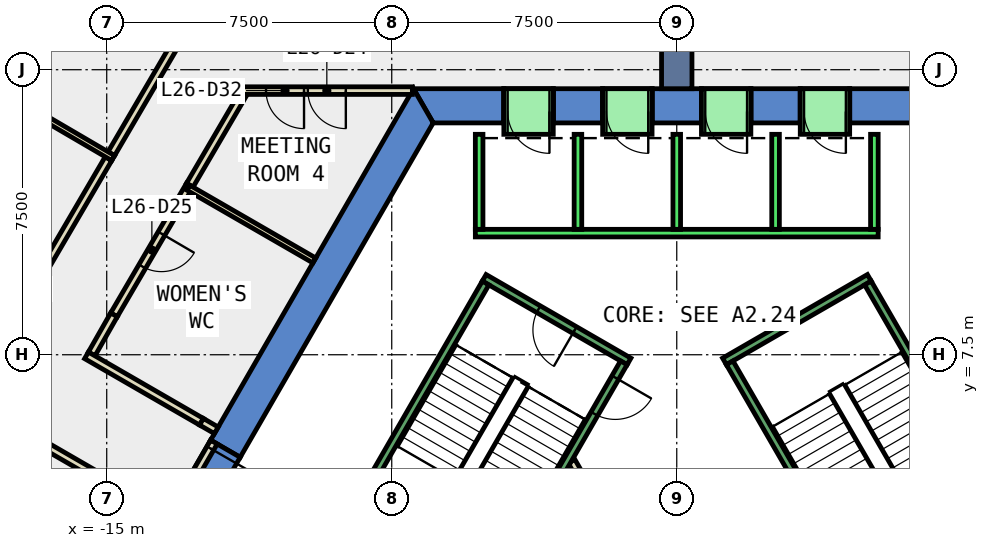
"""IFC4 building model, lengths in metres.
Left out: names, types, materials, properties, quantities, classifications, styles, units other than length and angle.
Written with IfcOpenShell. Run it as: python <this file> out.ifc"""

import sys

from ifc_helpers import new_model, si_unit, direction, frame, frame_2d, origin, place, context, subcontext, project, spatial, polyline, rectangle, outline, extrude, element, fill, save


model = new_model("IFC4")
c1 = context("Model", 3, precision=1e-05, world=origin(), true_north=direction((0.0, 1.0)))
c2 = subcontext(c1, "Body", "Model", "MODEL_VIEW")
j1 = project(units=[si_unit("LENGTHUNIT", "METRE"), si_unit("PLANEANGLEUNIT", "RADIAN")], contexts=[c1])
p1 = place(None, origin())
s1 = spatial("IfcSite", under=j1, at=p1, CompositionType="ELEMENT")
p2 = place(p1, origin())
s2 = spatial("IfcBuilding", under=s1, at=p2, CompositionType="ELEMENT")
p3 = place(p2, frame((0.0, 0.0, 120.2)))
s3 = spatial("IfcBuildingStorey", under=s2, at=p3, CompositionType="ELEMENT", Elevation=120.2)
p4 = place(p3, frame((0.0, 0.0, -0.4)))
e1 = element("IfcWall", 1, at=p4, inside=s3, PredefinedType="SHEAR", context=c2, shape_type="SweptSolid", body=[
    extrude(outline(polyline([(4.55, 14.5), (4.55, 13.6), (6.409, 13.6), (6.928, 14.5), (4.55, 14.5)])), origin(), (0.0, 0.0, 1.0), 4.2),
])
p5 = place(p3, frame((0.0, 0.0, -0.4)))
e2 = element("IfcWall", 2, at=p5, inside=s3, PredefinedType="SHEAR", context=c2, shape_type="SweptSolid", body=[
    extrude(outline(polyline([(1.95, 14.5), (1.95, 13.6), (3.25, 13.6), (3.25, 14.5), (1.95, 14.5)])), origin(), (0.0, 0.0, 1.0), 4.2),
])
p6 = place(p3, frame((0.0, 0.0, -0.4)))
e3 = element("IfcWall", 3, at=p6, inside=s3, PredefinedType="SHEAR", context=c2, shape_type="SweptSolid", body=[
    extrude(outline(polyline([(-0.65, 14.5), (-0.65, 13.6), (0.65, 13.6), (0.65, 14.5), (-0.65, 14.5)])), origin(), (0.0, 0.0, 1.0), 4.2),
])
p7 = place(p3, frame((0.0, 0.0, -0.4)))
e4 = element("IfcWall", 4, at=p7, inside=s3, PredefinedType="SHEAR", context=c2, shape_type="SweptSolid", body=[
    extrude(outline(polyline([(-3.25, 14.5), (-3.25, 13.6), (-1.95, 13.6), (-1.95, 14.5), (-3.25, 14.5)])), origin(), (0.0, 0.0, 1.0), 4.2),
])
p8 = place(p3, frame((0.0, 0.0, -0.4)))
e5 = element("IfcWall", 5, at=p8, inside=s3, PredefinedType="SHEAR", context=c2, shape_type="SweptSolid", body=[
    extrude(outline(polyline([(-4.55, 13.6), (-4.55, 14.5), (-6.928, 14.5), (-6.409, 13.6), (-4.55, 13.6)])), origin(), (0.0, 0.0, 1.0), 4.2),
])
p9 = place(p3, frame((0.0, 0.0, 3.6)))
e6 = element("IfcWall", 6, at=p9, inside=s3, PredefinedType="SHEAR", context=c2, shape_type="SweptSolid", body=[
    extrude(outline(polyline([(3.25, 14.5), (3.25, 13.6), (4.55, 13.6), (4.55, 14.5), (3.25, 14.5)])), origin(), (0.0, 0.0, 1.0), 0.2),
])
p10 = place(p3, frame((0.0, 0.0, 3.6)))
e7 = element("IfcWall", 7, at=p10, inside=s3, PredefinedType="SHEAR", context=c2, shape_type="SweptSolid", body=[
    extrude(outline(polyline([(0.65, 14.5), (0.65, 13.6), (1.95, 13.6), (1.95, 14.5), (0.65, 14.5)])), origin(), (0.0, 0.0, 1.0), 0.2),
])
p11 = place(p3, frame((0.0, 0.0, 3.6)))
e8 = element("IfcWall", 8, at=p11, inside=s3, PredefinedType="SHEAR", context=c2, shape_type="SweptSolid", body=[
    extrude(outline(polyline([(-1.95, 14.5), (-1.95, 13.6), (-0.65, 13.6), (-0.65, 14.5), (-1.95, 14.5)])), origin(), (0.0, 0.0, 1.0), 0.2),
])
p12 = place(p3, frame((0.0, 0.0, 3.6)))
e9 = element("IfcWall", 9, at=p12, inside=s3, PredefinedType="SHEAR", context=c2, shape_type="SweptSolid", body=[
    extrude(outline(polyline([(-4.55, 14.5), (-4.55, 13.6), (-3.25, 13.6), (-3.25, 14.5), (-4.55, 14.5)])), origin(), (0.0, 0.0, 1.0), 0.2),
])
p13 = place(p3, frame((0.0, 0.0, -0.4)))
e10 = element("IfcWall", 10, at=p13, inside=s3, PredefinedType="SHEAR", context=c2, shape_type="SweptSolid", body=[
    extrude(outline(polyline([(-12.267, 5.252), (-11.488, 4.802), (-6.409, 13.6), (-6.928, 14.5), (-12.267, 5.252)])), origin(), (0.0, 0.0, 1.0), 4.2),
])
p14 = place(p3, frame((0.0, 0.0, 3.6)))
e11 = element("IfcWall", 11, at=p14, inside=s3, PredefinedType="SHEAR", context=c2, shape_type="SweptSolid", body=[
    extrude(outline(polyline([(-13.267, 3.52), (-12.488, 3.07), (-11.488, 4.802), (-12.267, 5.252), (-13.267, 3.52)])), origin(), (0.0, 0.0, 1.0), 0.2),
])
p15 = place(p3, frame((0.0, 14.5, -0.4), z_axis=(0.0, 0.0, 1.0), x_axis=(0.0, 1.0, 0.0)))
e12 = element("IfcWall", 12, at=p15, inside=s3, PredefinedType="SHEAR", context=c2, shape_type="SweptSolid", body=[
    extrude(rectangle(XDim=9.0, YDim=0.8, at=frame_2d((4.5, 0.0))), origin(), (0.0, 0.0, 1.0), 4.2),
])
p16 = place(p3, frame((-11.409, 14.364, 0.0), z_axis=(0.0, 0.0, 1.0), x_axis=(-0.504846343003, -0.863209227219, 0.0)))
e13 = element("IfcWall", 13, at=p16, inside=s3, PredefinedType="PARTITIONING", context=c2, shape_type="SweptSolid", body=[
    extrude(rectangle(XDim=2.785, YDim=0.2, at=frame_2d((1.393, 0.0))), origin(), (0.0, 0.0, 1.0), 3.8),
])
p17 = place(p3, frame((-12.815, 11.96, 0.0), z_axis=(0.0, 0.0, 1.0), x_axis=(-0.5048198861, -0.863224699946, 0.0)))
e14 = element("IfcWall", 14, at=p17, inside=s3, PredefinedType="PARTITIONING", context=c2, shape_type="SweptSolid", body=[
    extrude(rectangle(XDim=3.95, YDim=0.2, at=frame_2d((1.975, 0.0))), origin(), (0.0, 0.0, 1.0), 3.8),
])
p18 = place(p17, frame((1.475, 0.0, 0.0)))
e15 = element("IfcOpeningElement", 15, at=p18, cuts=e14, PredefinedType="OPENING", context=c2, shape_type="SweptSolid", body=[
    extrude(rectangle(XDim=1.0, YDim=2.1, at=frame_2d((0.5, 1.05))), frame((0.0, 0.11, 0.0), z_axis=(0.0, -1.0, 0.0), x_axis=(1.0, 0.0, 0.0)), (0.0, 0.0, 1.0), 0.22),
])
p19 = place(p3, frame((-14.809, 8.55, 0.0), z_axis=(0.0, 0.0, 1.0), x_axis=(-0.495074026382, -0.868850797549, 0.0)))
e16 = element("IfcWall", 16, at=p19, inside=s3, PredefinedType="PARTITIONING", context=c2, shape_type="SweptSolid", body=[
    extrude(rectangle(XDim=1.186, YDim=0.2, at=frame_2d((0.593, 0.0))), origin(), (0.0, 0.0, 1.0), 3.8),
])
p20 = place(p3, frame((-15.532, 7.484, 0.0), z_axis=(0.0, 0.0, 1.0), x_axis=(0.866045954906, -0.499964402723, 0.0)))
e17 = element("IfcWall", 17, at=p20, inside=s3, PredefinedType="PARTITIONING", context=c2, shape_type="SweptSolid", body=[
    extrude(rectangle(XDim=3.494, YDim=0.2, at=frame_2d((1.747, 0.0))), origin(), (0.0, 0.0, 1.0), 3.8),
])
p21 = place(p3, frame((-14.879, 12.789, 0.0), z_axis=(0.0, 0.0, 1.0), x_axis=(0.504763220102, 0.863257836126, 0.0)))
e18 = element("IfcWall", 18, at=p21, inside=s3, PredefinedType="PARTITIONING", context=c2, shape_type="SweptSolid", body=[
    extrude(rectangle(XDim=3.487, YDim=0.2, at=frame_2d((1.743, 0.0))), origin(), (0.0, 0.0, 1.0), 3.8),
])
p22 = place(p3, frame((-16.714, 9.65, 0.0), z_axis=(0.0, 0.0, 1.0), x_axis=(0.504885284202, 0.863186451351, 0.0)))
e19 = element("IfcWall", 19, at=p22, inside=s3, PredefinedType="PARTITIONING", context=c2, shape_type="SweptSolid", body=[
    extrude(rectangle(XDim=3.486, YDim=0.2, at=frame_2d((1.743, 0.0))), origin(), (0.0, 0.0, 1.0), 3.8),
])
p23 = place(p3, frame((-9.537, 9.981, 0.0), z_axis=(0.0, 0.0, 1.0), x_axis=(-0.866068787954, 0.499924848885, 0.0)))
e20 = element("IfcWall", 20, at=p23, inside=s3, PredefinedType="PARTITIONING", context=c2, shape_type="SweptSolid", body=[
    extrude(rectangle(XDim=3.829, YDim=0.15, at=frame_2d((1.914, 0.0))), origin(), (0.0, 0.0, 1.0), 3.8),
])
p24 = place(p3, frame((-6.957, 14.45, 0.0), z_axis=(0.0, 0.0, 1.0), x_axis=(-1.0, 0.0, 0.0)))
e21 = element("IfcWall", 21, at=p24, inside=s3, PredefinedType="PARTITIONING", context=c2, shape_type="SweptSolid", body=[
    extrude(rectangle(XDim=4.502, YDim=0.2, at=frame_2d((2.251, 0.0))), origin(), (0.0, 0.0, 1.0), 3.8),
])
p25 = place(p24, frame((1.751, 0.0, 0.0)))
e22 = element("IfcOpeningElement", 22, at=p25, cuts=e21, PredefinedType="OPENING", context=c2, shape_type="SweptSolid", body=[
    extrude(rectangle(XDim=1.0, YDim=2.1, at=frame_2d((0.5, 1.05))), frame((0.0, 0.11, 0.0), z_axis=(0.0, -1.0, 0.0), x_axis=(1.0, 0.0, 0.0)), (0.0, 0.0, 1.0), 0.22),
])
p26 = place(p24, frame((2.851, 0.0, 0.0)))
e23 = element("IfcOpeningElement", 23, at=p26, cuts=e21, PredefinedType="OPENING", context=c2, shape_type="SweptSolid", body=[
    extrude(rectangle(XDim=1.0, YDim=2.1, at=frame_2d((0.5, 1.05))), frame((0.0, 0.11, 0.0), z_axis=(0.0, -1.0, 0.0), x_axis=(1.0, 0.0, 0.0)), (0.0, 0.0, 1.0), 0.22),
])
p27 = place(p3, frame((-2.771, 4.7, 0.0), z_axis=(0.0, 0.0, 1.0), x_axis=(0.499969479948, -0.866043023828, 0.0)))
e24 = element("IfcWall", 24, at=p27, inside=s3, PredefinedType="PARTITIONING", context=c2, shape_type="SweptSolid", body=[
    extrude(rectangle(XDim=4.99, YDim=0.2, at=frame_2d((2.495, 0.0))), origin(), (0.0, 0.0, 1.0), 3.8),
])
p28 = place(p27, frame((1.945, 0.0, 0.0)))
e25 = element("IfcOpeningElement", 25, at=p28, cuts=e24, PredefinedType="OPENING", context=c2, shape_type="SweptSolid", body=[
    extrude(rectangle(XDim=1.0, YDim=2.1, at=frame_2d((0.5, 1.05))), frame((0.0, 0.11, 0.0), z_axis=(0.0, -1.0, 0.0), x_axis=(1.0, 0.0, 0.0)), (0.0, 0.0, 1.0), 0.22),
])
p29 = place(p3, frame((-14.83, 12.674, 0.0), z_axis=(0.0, 0.0, 1.0), x_axis=(-0.863237916953, 0.504797284794, 0.0)))
e26 = element("IfcWall", 26, at=p29, inside=s3, PredefinedType="PARTITIONING", context=c2, shape_type="SweptSolid", body=[
    extrude(rectangle(XDim=7.7, YDim=0.15, at=frame_2d((3.85, 0.0))), origin(), (0.0, 0.0, 1.0), 3.8),
])
p30 = place(p3, frame((-12.18, 5.202, 0.0), z_axis=(0.0, 0.0, 1.0), x_axis=(-0.50002537861, -0.866010750942, 0.0)))
e27 = element("IfcWall", 27, at=p30, inside=s3, PredefinedType="PARTITIONING", context=c2, shape_type="SweptSolid", body=[
    extrude(rectangle(XDim=2.0, YDim=0.2, at=frame_2d((1.0, 0.0))), origin(), (0.0, 0.0, 1.0), 2.4),
])
p31 = place(p30, frame((0.19, 0.0, 0.0)))
e28 = element("IfcOpeningElement", 28, at=p31, cuts=e27, PredefinedType="OPENING", context=c2, shape_type="SweptSolid", body=[
    extrude(rectangle(XDim=1.8, YDim=2.1, at=frame_2d((0.9, 1.05))), frame((0.0, 0.11, 0.0), z_axis=(0.0, -1.0, 0.0), x_axis=(1.0, 0.0, 0.0)), (0.0, 0.0, 1.0), 0.22),
])
p32 = place(p3, frame((-12.506, 5.737, 0.0), z_axis=(0.0, 0.0, 1.0), x_axis=(0.865624510465, -0.500693725627, 0.0)))
e29 = element("IfcWall", 29, at=p32, inside=s3, PredefinedType="PARTITIONING", context=c2, shape_type="SweptSolid", body=[
    extrude(rectangle(XDim=0.449, YDim=0.2, at=frame_2d((0.225, 0.0))), origin(), (0.0, 0.0, 1.0), 2.4),
])
p33 = place(p3, frame((-13.807, 3.485, 0.0), z_axis=(0.0, 0.0, 1.0), x_axis=(-0.865984597717, 0.500070671522, 0.0)))
e30 = element("IfcWall", 30, at=p33, inside=s3, PredefinedType="PARTITIONING", context=c2, shape_type="SweptSolid", body=[
    extrude(rectangle(XDim=3.479, YDim=0.2, at=frame_2d((1.74, 0.0))), origin(), (0.0, 0.0, 1.0), 3.8),
])
p34 = place(p3, frame((5.3, 10.7, 0.0), z_axis=(0.0, 0.0, 1.0), x_axis=(-1.0, 0.0, 0.0)))
e31 = element("IfcWall", 31, at=p34, inside=s3, PredefinedType="STANDARD", context=c2, shape_type="SweptSolid", body=[
    extrude(rectangle(XDim=10.6, YDim=0.2, at=frame_2d((5.3, 0.0))), origin(), (0.0, 0.0, 1.0), 3.8),
])
for number, where, z_axis, x_axis in (
    (32, (5.2, 10.8, 0.0), (0.0, 0.0, 1.0), (0.0, 1.0, 0.0)),
    (33, (2.6, 10.8, 0.0), (0.0, 0.0, 1.0), (0.0, 1.0, 0.0)),
    (34, (0.0, 10.8, 0.0), (0.0, 0.0, 1.0), (0.0, 1.0, 0.0)),
    (35, (-2.6, 10.8, 0.0), (0.0, 0.0, 1.0), (0.0, 1.0, 0.0)),
    (36, (-5.2, 10.8, 0.0), (0.0, 0.0, 1.0), (0.0, 1.0, 0.0)),
):
    element("IfcWall", number, at=place(p3, frame(where, z_axis=z_axis, x_axis=x_axis)), inside=s3, PredefinedType="STANDARD", context=c2, shape_type="SweptSolid", body=[
        extrude(rectangle(XDim=2.5, YDim=0.2, at=frame_2d((1.25, 0.0))), origin(), (0.0, 0.0, 1.0), 3.8),
    ])
p35 = place(p3, frame((4.55, 13.9, 0.0), z_axis=(0.0, 0.0, 1.0), x_axis=(-1.0, 0.0, 0.0)))
e37 = element("IfcWall", 37, at=p35, inside=s3, PredefinedType="STANDARD", context=c2, shape_type="SweptSolid", body=[
    extrude(rectangle(XDim=1.3, YDim=1.2, at=frame_2d((0.65, 0.0))), origin(), (0.0, 0.0, 1.0), 2.4),
])
p36 = place(p35, frame((0.1, 0.0, 0.0)))
e38 = element("IfcOpeningElement", 38, at=p36, cuts=e37, PredefinedType="OPENING", context=c2, shape_type="SweptSolid", body=[
    extrude(rectangle(XDim=1.1, YDim=2.3, at=frame_2d((0.55, 1.15))), frame((0.0, 0.61, 0.0), z_axis=(0.0, -1.0, 0.0), x_axis=(1.0, 0.0, 0.0)), (0.0, 0.0, 1.0), 1.22),
])
p37 = place(p3, frame((1.95, 13.9, 0.0), z_axis=(0.0, 0.0, 1.0), x_axis=(-1.0, 0.0, 0.0)))
e39 = element("IfcWall", 39, at=p37, inside=s3, PredefinedType="STANDARD", context=c2, shape_type="SweptSolid", body=[
    extrude(rectangle(XDim=1.3, YDim=1.2, at=frame_2d((0.65, 0.0))), origin(), (0.0, 0.0, 1.0), 2.4),
])
p38 = place(p37, frame((0.1, 0.0, 0.0)))
e40 = element("IfcOpeningElement", 40, at=p38, cuts=e39, PredefinedType="OPENING", context=c2, shape_type="SweptSolid", body=[
    extrude(rectangle(XDim=1.1, YDim=2.3, at=frame_2d((0.55, 1.15))), frame((0.0, 0.61, 0.0), z_axis=(0.0, -1.0, 0.0), x_axis=(1.0, 0.0, 0.0)), (0.0, 0.0, 1.0), 1.22),
])
p39 = place(p3, frame((-0.65, 13.9, 0.0), z_axis=(0.0, 0.0, 1.0), x_axis=(-1.0, 0.0, 0.0)))
e41 = element("IfcWall", 41, at=p39, inside=s3, PredefinedType="STANDARD", context=c2, shape_type="SweptSolid", body=[
    extrude(rectangle(XDim=1.3, YDim=1.2, at=frame_2d((0.65, 0.0))), origin(), (0.0, 0.0, 1.0), 2.4),
])
p40 = place(p39, frame((0.1, 0.0, 0.0)))
e42 = element("IfcOpeningElement", 42, at=p40, cuts=e41, PredefinedType="OPENING", context=c2, shape_type="SweptSolid", body=[
    extrude(rectangle(XDim=1.1, YDim=2.3, at=frame_2d((0.55, 1.15))), frame((0.0, 0.61, 0.0), z_axis=(0.0, -1.0, 0.0), x_axis=(1.0, 0.0, 0.0)), (0.0, 0.0, 1.0), 1.22),
])
p41 = place(p3, frame((-3.25, 13.9, 0.0), z_axis=(0.0, 0.0, 1.0), x_axis=(-1.0, 0.0, 0.0)))
e43 = element("IfcWall", 43, at=p41, inside=s3, PredefinedType="STANDARD", context=c2, shape_type="SweptSolid", body=[
    extrude(rectangle(XDim=1.3, YDim=1.2, at=frame_2d((0.65, 0.0))), origin(), (0.0, 0.0, 1.0), 2.4),
])
p42 = place(p41, frame((0.1, 0.0, 0.0)))
e44 = element("IfcOpeningElement", 44, at=p42, cuts=e43, PredefinedType="OPENING", context=c2, shape_type="SweptSolid", body=[
    extrude(rectangle(XDim=1.1, YDim=2.3, at=frame_2d((0.55, 1.15))), frame((0.0, 0.61, 0.0), z_axis=(0.0, -1.0, 0.0), x_axis=(1.0, 0.0, 0.0)), (0.0, 0.0, 1.0), 1.22),
])
p43 = place(p3, frame((1.256, 7.324, 0.0), z_axis=(0.0, 0.0, 1.0), x_axis=(0.866046073146, 0.499964197906, 0.0)))
e45 = element("IfcWall", 45, at=p43, inside=s3, PredefinedType="STANDARD", context=c2, shape_type="SweptSolid", body=[
    extrude(rectangle(XDim=4.4, YDim=0.2, at=frame_2d((2.2, 0.0))), origin(), (0.0, 0.0, 1.0), 3.8),
])
p44 = place(p3, frame((4.843, 1.312, 0.0), z_axis=(0.0, 0.0, 1.0), x_axis=(-0.499963383562, 0.866046543262, 0.0)))
e46 = element("IfcWall", 46, at=p44, inside=s3, PredefinedType="STANDARD", context=c2, shape_type="SweptSolid", body=[
    extrude(rectangle(XDim=6.9, YDim=0.2, at=frame_2d((3.45, 0.0))), origin(), (0.0, 0.0, 1.0), 3.8),
])
p45 = place(p44, frame((0.45, 0.0, 0.0)))
e47 = element("IfcOpeningElement", 47, at=p45, cuts=e46, PredefinedType="OPENING", context=c2, shape_type="SweptSolid", body=[
    extrude(rectangle(XDim=1.1, YDim=2.2, at=frame_2d((0.55, 1.1))), frame((0.0, 0.11, 0.0), z_axis=(0.0, -1.0, 0.0), x_axis=(1.0, 0.0, 0.0)), (0.0, 0.0, 1.0), 0.22),
])
p46 = place(p3, frame((8.48, 3.412, 0.0), z_axis=(0.0, 0.0, 1.0), x_axis=(-0.499978703459, 0.866037698999, 0.0)))
e48 = element("IfcWall", 48, at=p46, inside=s3, PredefinedType="STANDARD", context=c2, shape_type="SweptSolid", body=[
    extrude(rectangle(XDim=6.9, YDim=0.2, at=frame_2d((3.45, 0.0))), origin(), (0.0, 0.0, 1.0), 3.8),
])
p47 = place(p3, frame((-1.256, 7.324, 0.0), z_axis=(0.0, 0.0, 1.0), x_axis=(-0.866046073146, 0.499964197906, 0.0)))
e49 = element("IfcWall", 49, at=p47, inside=s3, PredefinedType="STANDARD", context=c2, shape_type="SweptSolid", body=[
    extrude(rectangle(XDim=4.4, YDim=0.2, at=frame_2d((2.2, 0.0))), origin(), (0.0, 0.0, 1.0), 3.8),
])
p48 = place(p47, frame((1.65, 0.0, 0.0)))
e50 = element("IfcOpeningElement", 50, at=p48, cuts=e49, PredefinedType="OPENING", context=c2, shape_type="SweptSolid", body=[
    extrude(rectangle(XDim=1.1, YDim=2.2, at=frame_2d((0.55, 1.1))), frame((0.0, 0.11, 0.0), z_axis=(0.0, -1.0, 0.0), x_axis=(1.0, 0.0, 0.0)), (0.0, 0.0, 1.0), 0.22),
])
p49 = place(p3, frame((-1.393, 7.288, 0.0), z_axis=(0.0, 0.0, 1.0), x_axis=(-0.499963383562, -0.866046543262, 0.0)))
e51 = element("IfcWall", 51, at=p49, inside=s3, PredefinedType="STANDARD", context=c2, shape_type="SweptSolid", body=[
    extrude(rectangle(XDim=6.9, YDim=0.2, at=frame_2d((3.45, 0.0))), origin(), (0.0, 0.0, 1.0), 3.8),
])
p50 = place(p49, frame((0.45, 0.0, 0.0)))
e52 = element("IfcOpeningElement", 52, at=p50, cuts=e51, PredefinedType="OPENING", context=c2, shape_type="SweptSolid", body=[
    extrude(rectangle(XDim=1.1, YDim=2.2, at=frame_2d((0.55, 1.1))), frame((0.0, 0.11, 0.0), z_axis=(0.0, -1.0, 0.0), x_axis=(1.0, 0.0, 0.0)), (0.0, 0.0, 1.0), 0.22),
])
p51 = place(p3, frame((-5.03, 9.388, 0.0), z_axis=(0.0, 0.0, 1.0), x_axis=(-0.499978703459, -0.866037698999, 0.0)))
e53 = element("IfcWall", 53, at=p51, inside=s3, PredefinedType="STANDARD", context=c2, shape_type="SweptSolid", body=[
    extrude(rectangle(XDim=6.9, YDim=0.2, at=frame_2d((3.45, 0.0))), origin(), (0.0, 0.0, 1.0), 3.8),
])
p52 = place(p25, origin())
e54 = element("IfcDoor", 54, at=p52, inside=s3, OperationType="SINGLE_SWING_LEFT", PredefinedType="DOOR", context=c2, shape_type="SweptSolid", body=[
    extrude(rectangle(XDim=1.0, YDim=2.1, at=frame_2d((0.5, 1.05))), frame((0.0, 0.025, 0.0), z_axis=(0.0, -1.0, 0.0), x_axis=(1.0, 0.0, 0.0)), (0.0, 0.0, 1.0), 0.05),
])
fill(e22, e54)
p53 = place(p18, origin())
e55 = element("IfcDoor", 55, at=p53, inside=s3, OperationType="SINGLE_SWING_RIGHT", PredefinedType="DOOR", context=c2, shape_type="SweptSolid", body=[
    extrude(rectangle(XDim=1.0, YDim=2.1, at=frame_2d((0.5, 1.05))), frame((0.0, 0.025, 0.0), z_axis=(0.0, -1.0, 0.0), x_axis=(1.0, 0.0, 0.0)), (0.0, 0.0, 1.0), 0.05),
])
fill(e15, e55)
p54 = place(p26, origin())
e56 = element("IfcDoor", 56, at=p54, inside=s3, OperationType="SINGLE_SWING_RIGHT", PredefinedType="DOOR", context=c2, shape_type="SweptSolid", body=[
    extrude(rectangle(XDim=1.0, YDim=2.1, at=frame_2d((0.5, 1.05))), frame((0.0, 0.025, 0.0), z_axis=(0.0, -1.0, 0.0), x_axis=(1.0, 0.0, 0.0)), (0.0, 0.0, 1.0), 0.05),
])
fill(e23, e56)
p55 = place(p31, origin())
e57 = element("IfcDoor", 57, at=p55, inside=s3, OperationType="DOUBLE_DOOR_SINGLE_SWING", PredefinedType="DOOR", context=c2, shape_type="SweptSolid", body=[
    extrude(rectangle(XDim=1.8, YDim=2.1, at=frame_2d((0.9, 1.05))), frame((0.0, 0.025, 0.0), z_axis=(0.0, -1.0, 0.0), x_axis=(1.0, 0.0, 0.0)), (0.0, 0.0, 1.0), 0.05),
])
fill(e28, e57)
p56 = place(p36, origin())
e58 = element("IfcDoor", 58, at=p56, inside=s3, OperationType="SLIDING_TO_LEFT", PredefinedType="DOOR", context=c2, shape_type="SweptSolid", body=[
    extrude(rectangle(XDim=1.1, YDim=2.3, at=frame_2d((0.55, 1.15))), frame((0.0, 0.025, 0.0), z_axis=(0.0, -1.0, 0.0), x_axis=(1.0, 0.0, 0.0)), (0.0, 0.0, 1.0), 0.05),
])
fill(e38, e58)
p57 = place(p38, origin())
e59 = element("IfcDoor", 59, at=p57, inside=s3, OperationType="SLIDING_TO_LEFT", PredefinedType="DOOR", context=c2, shape_type="SweptSolid", body=[
    extrude(rectangle(XDim=1.1, YDim=2.3, at=frame_2d((0.55, 1.15))), frame((0.0, 0.025, 0.0), z_axis=(0.0, -1.0, 0.0), x_axis=(1.0, 0.0, 0.0)), (0.0, 0.0, 1.0), 0.05),
])
fill(e40, e59)
p58 = place(p40, origin())
e60 = element("IfcDoor", 60, at=p58, inside=s3, OperationType="SLIDING_TO_LEFT", PredefinedType="DOOR", context=c2, shape_type="SweptSolid", body=[
    extrude(rectangle(XDim=1.1, YDim=2.3, at=frame_2d((0.55, 1.15))), frame((0.0, 0.025, 0.0), z_axis=(0.0, -1.0, 0.0), x_axis=(1.0, 0.0, 0.0)), (0.0, 0.0, 1.0), 0.05),
])
fill(e42, e60)
p59 = place(p42, origin())
e61 = element("IfcDoor", 61, at=p59, inside=s3, OperationType="SLIDING_TO_LEFT", PredefinedType="DOOR", context=c2, shape_type="SweptSolid", body=[
    extrude(rectangle(XDim=1.1, YDim=2.3, at=frame_2d((0.55, 1.15))), frame((0.0, 0.025, 0.0), z_axis=(0.0, -1.0, 0.0), x_axis=(1.0, 0.0, 0.0)), (0.0, 0.0, 1.0), 0.05),
])
fill(e44, e61)
p60 = place(p50, origin())
e62 = element("IfcDoor", 62, at=p60, inside=s3, OperationType="SINGLE_SWING_LEFT", PredefinedType="DOOR", context=c2, shape_type="SweptSolid", body=[
    extrude(rectangle(XDim=1.1, YDim=2.2, at=frame_2d((0.55, 1.1))), frame((0.0, 0.025, 0.0), z_axis=(0.0, -1.0, 0.0), x_axis=(1.0, 0.0, 0.0)), (0.0, 0.0, 1.0), 0.05),
])
fill(e52, e62)
p61 = place(p48, origin())
e63 = element("IfcDoor", 63, at=p61, inside=s3, OperationType="SINGLE_SWING_LEFT", PredefinedType="DOOR", context=c2, shape_type="SweptSolid", body=[
    extrude(rectangle(XDim=1.1, YDim=2.2, at=frame_2d((0.55, 1.1))), frame((0.0, 0.025, 0.0), z_axis=(0.0, -1.0, 0.0), x_axis=(1.0, 0.0, 0.0)), (0.0, 0.0, 1.0), 0.05),
])
fill(e50, e63)
save(model, sys.argv[1])
